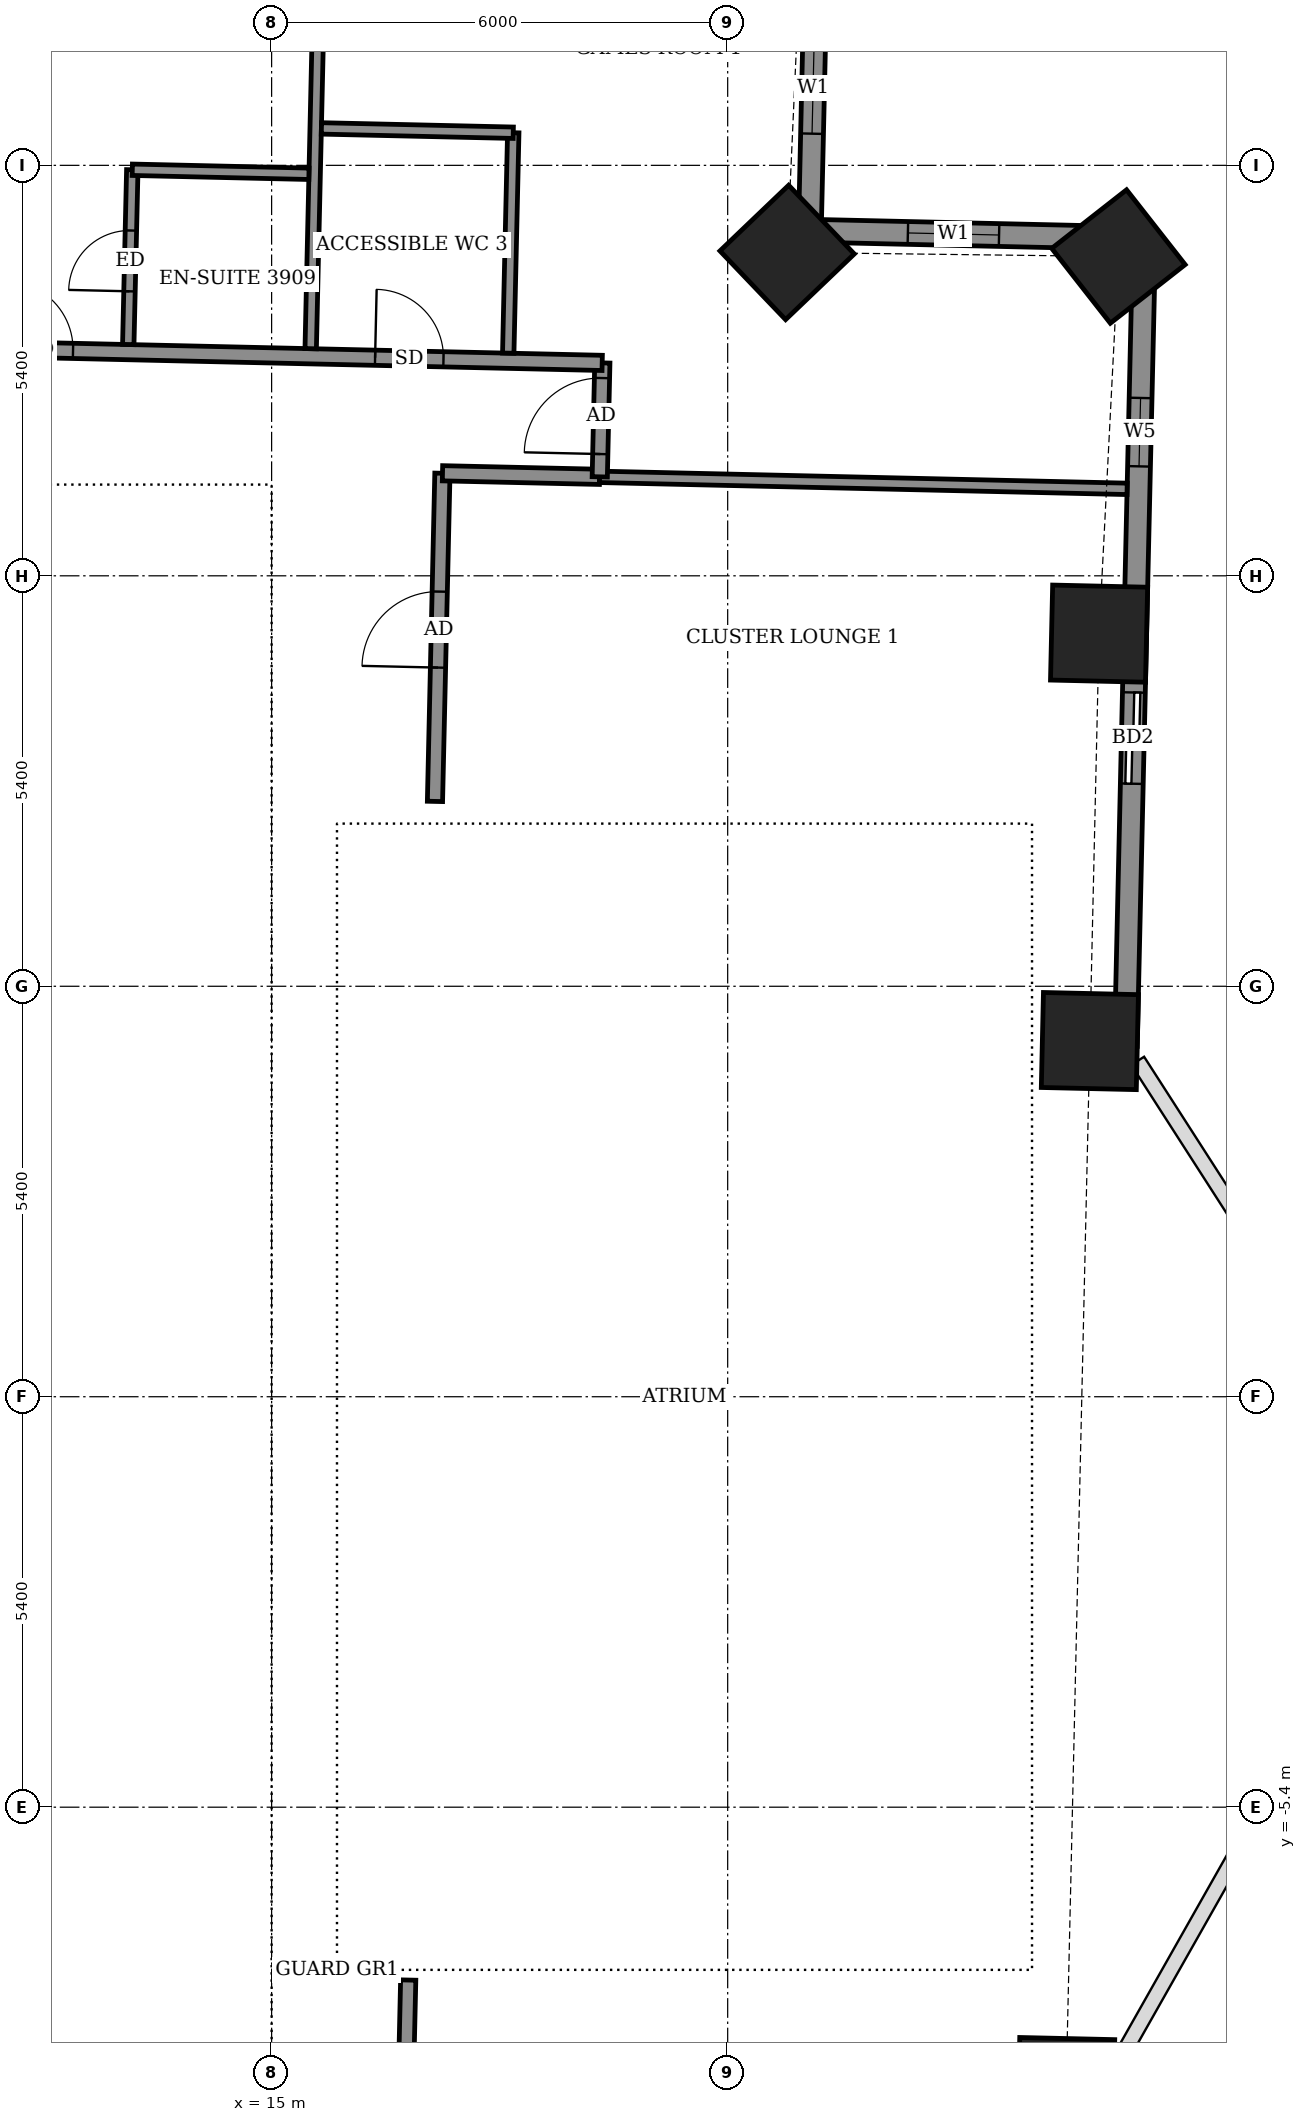
"""IFC4 building model, lengths in metres.
Left out: names, types, materials, properties, quantities, classifications, styles, units other than length and angle.
Written with IfcOpenShell. Run it as: python <this file> out.ifc"""

import sys

from ifc_helpers import new_model, si_unit, direction, frame, frame_2d, origin, origin_2d, place, context, subcontext, project, spatial, rectangle, extrude, element, fill, save


model = new_model("IFC4")
c1 = context("Model", 3, precision=1e-05, world=origin(), true_north=direction((0.0, 1.0)))
c2 = subcontext(c1, "Body", "Model", "MODEL_VIEW")
j1 = project(units=[si_unit("LENGTHUNIT", "METRE"), si_unit("PLANEANGLEUNIT", "RADIAN")], contexts=[c1])
p1 = place(None, origin())
s1 = spatial("IfcSite", under=j1, at=p1, CompositionType="ELEMENT")
p2 = place(p1, origin())
s2 = spatial("IfcBuilding", under=s1, at=p2, CompositionType="ELEMENT")
p3 = place(p2, frame((0.0, 0.0, 156.3)))
s3 = spatial("IfcBuildingStorey", under=s2, at=p3, CompositionType="ELEMENT", Elevation=156.3)
for number, where, z_axis, x_axis in (
    (1, (25.453, -9.069, -0.55), (0.0, 0.0, 1.0), (0.023, 1.0, 0.0)),
    (2, (25.765, 4.679, -0.55), (0.0, 0.0, 1.0), (0.023, 1.0, 0.0)),
    (3, (25.886, 10.039, -0.55), (0.0, 0.0, 1.0), (0.023, 1.0, 0.0)),
    (4, (26.141, 15.001, -0.55), (0.0, 0.0, 1.0), (-0.617, 0.787, 0.0)),
    (5, (21.782, 15.054, -0.55), (0.0, 0.0, 1.0), (-0.691, 0.723, 0.0)),
):
    element("IfcColumn", number, at=place(p3, frame(where, z_axis=z_axis, x_axis=x_axis)), inside=s3, PredefinedType="COLUMN", context=c2, shape_type="SweptSolid", body=[
        extrude(rectangle(XDim=1.25, YDim=1.25, at=origin_2d()), origin(), (0.0, 0.0, 1.0), 3.6),
    ])
p4 = place(p3, frame((26.238, 4.613, 0.0), z_axis=(0.0, 0.0, 1.0), x_axis=(0.022761056451, 0.999740933597, 0.0)))
e6 = element("IfcWall", 6, at=p4, inside=s3, PredefinedType="SOLIDWALL", context=c2, shape_type="SweptSolid", body=[
    extrude(rectangle(XDim=10.63, YDim=0.3, at=frame_2d((5.315, 0.0))), origin(), (0.0, 0.0, 1.0), 3.05),
])
p5 = place(p4, frame((3.453, 0.0, 0.0)))
e7 = element("IfcOpeningElement", 7, at=p5, cuts=e6, PredefinedType="OPENING", context=c2, shape_type="SweptSolid", body=[
    extrude(rectangle(XDim=1.2, YDim=2.4, at=frame_2d((0.6, 1.2))), frame((0.0, 0.16, 0.0), z_axis=(0.0, -1.0, 0.0), x_axis=(1.0, 0.0, 0.0)), (0.0, 0.0, 1.0), 0.32),
])
p6 = place(p4, frame((7.629, 0.0, 0.9)))
e8 = element("IfcOpeningElement", 8, at=p6, cuts=e6, PredefinedType="OPENING", context=c2, shape_type="SweptSolid", body=[
    extrude(rectangle(XDim=0.9, YDim=1.5, at=frame_2d((0.45, 0.75))), frame((0.0, 0.16, 0.0), z_axis=(0.0, -1.0, 0.0), x_axis=(1.0, 0.0, 0.0)), (0.0, 0.0, 1.0), 0.32),
])
p7 = place(p3, frame((26.48, 15.24, 0.0), z_axis=(0.0, 0.0, 1.0), x_axis=(-0.999741204967, 0.022749133868, 0.0)))
e9 = element("IfcWall", 9, at=p7, inside=s3, PredefinedType="SOLIDWALL", context=c2, shape_type="SweptSolid", body=[
    extrude(rectangle(XDim=4.4, YDim=0.3, at=frame_2d((2.2, 0.0))), origin(), (0.0, 0.0, 1.0), 2.55),
])
p8 = place(p7, frame((1.91, 0.0, 0.9)))
e10 = element("IfcOpeningElement", 10, at=p8, cuts=e9, PredefinedType="OPENING", context=c2, shape_type="SweptSolid", body=[
    extrude(rectangle(XDim=1.2, YDim=1.5, at=frame_2d((0.6, 0.75))), frame((0.0, 0.16, 0.0), z_axis=(0.0, -1.0, 0.0), x_axis=(1.0, 0.0, 0.0)), (0.0, 0.0, 1.0), 0.32),
])
p9 = place(p3, frame((22.081, 15.34, 0.0), z_axis=(0.0, 0.0, 1.0), x_axis=(0.022693676786, 0.999742465355, 0.0)))
e11 = element("IfcWall", 11, at=p9, inside=s3, PredefinedType="SOLIDWALL", context=c2, shape_type="SweptSolid", body=[
    extrude(rectangle(XDim=4.4, YDim=0.3, at=frame_2d((2.2, 0.0))), origin(), (0.0, 0.0, 1.0), 2.55),
])
p10 = place(p9, frame((1.277, 0.0, 0.9)))
e12 = element("IfcOpeningElement", 12, at=p10, cuts=e11, PredefinedType="OPENING", context=c2, shape_type="SweptSolid", body=[
    extrude(rectangle(XDim=1.2, YDim=1.5, at=frame_2d((0.6, 0.75))), frame((0.0, 0.16, 0.0), z_axis=(0.0, -1.0, 0.0), x_axis=(1.0, 0.0, 0.0)), (0.0, 0.0, 1.0), 0.32),
])
p11 = place(p3, frame((16.611, -15.868, 0.0), z_axis=(0.0, 0.0, 1.0), x_axis=(0.022698399288, 0.999742358145, 0.0)))
e13 = element("IfcWall", 13, at=p11, inside=s3, PredefinedType="PARTITIONING", context=c2, shape_type="SweptSolid", body=[
    extrude(rectangle(XDim=8.196, YDim=0.2, at=frame_2d((4.098, 0.0))), origin(), (0.0, 0.0, 1.0), 3.05),
])
p12 = place(p11, frame((3.025, 0.0, 0.0)))
e14 = element("IfcOpeningElement", 14, at=p12, cuts=e13, PredefinedType="OPENING", context=c2, shape_type="SweptSolid", body=[
    extrude(rectangle(XDim=0.9, YDim=2.1, at=frame_2d((0.45, 1.05))), frame((0.0, 0.11, 0.0), z_axis=(0.0, -1.0, 0.0), x_axis=(1.0, 0.0, 0.0)), (0.0, 0.0, 1.0), 0.22),
])
p13 = place(p11, frame((5.786, 0.0, 0.0)))
e15 = element("IfcOpeningElement", 15, at=p13, cuts=e13, PredefinedType="OPENING", context=c2, shape_type="SweptSolid", body=[
    extrude(rectangle(XDim=1.0, YDim=2.1, at=frame_2d((0.5, 1.05))), frame((0.0, 0.11, 0.0), z_axis=(0.0, -1.0, 0.0), x_axis=(1.0, 0.0, 0.0)), (0.0, 0.0, 1.0), 0.22),
])
p14 = place(p3, frame((17.149, 7.832, 0.0), z_axis=(0.0, 0.0, 1.0), x_axis=(0.022729111383, 0.999741660378, 0.0)))
e16 = element("IfcWall", 16, at=p14, inside=s3, PredefinedType="PARTITIONING", context=c2, shape_type="SweptSolid", body=[
    extrude(rectangle(XDim=4.318, YDim=0.2, at=frame_2d((2.159, 0.0))), origin(), (0.0, 0.0, 1.0), 3.05),
])
p15 = place(p14, frame((1.761, 0.0, 0.0)))
e17 = element("IfcOpeningElement", 17, at=p15, cuts=e16, PredefinedType="OPENING", context=c2, shape_type="SweptSolid", body=[
    extrude(rectangle(XDim=1.0, YDim=2.1, at=frame_2d((0.5, 1.05))), frame((0.0, 0.11, 0.0), z_axis=(0.0, -1.0, 0.0), x_axis=(1.0, 0.0, 0.0)), (0.0, 0.0, 1.0), 0.22),
])
p16 = place(p3, frame((17.248, 12.149, 0.0), z_axis=(0.0, 0.0, 1.0), x_axis=(0.999742931749, -0.02267312106, 0.0)))
e18 = element("IfcWall", 18, at=p16, inside=s3, PredefinedType="PARTITIONING", context=c2, shape_type="SweptSolid", body=[
    extrude(rectangle(XDim=2.067, YDim=0.2, at=frame_2d((1.034, 0.0))), origin(), (0.0, 0.0, 1.0), 3.05),
])
p17 = place(p3, frame((19.315, 12.102, 0.0), z_axis=(0.0, 0.0, 1.0), x_axis=(0.999741072391, -0.022754959327, 0.0)))
e19 = element("IfcWall", 19, at=p17, inside=s3, PredefinedType="PARTITIONING", context=c2, shape_type="SweptSolid", body=[
    extrude(rectangle(XDim=6.942, YDim=0.15, at=frame_2d((3.471, 0.0))), origin(), (0.0, 0.0, 1.0), 2.55),
])
p18 = place(p3, frame((19.317, 12.102, 0.0), z_axis=(0.0, 0.0, 1.0), x_axis=(0.02279537805, 0.999740151609, 0.0)))
e20 = element("IfcWall", 20, at=p18, inside=s3, PredefinedType="PARTITIONING", context=c2, shape_type="SweptSolid", body=[
    extrude(rectangle(XDim=1.5, YDim=0.2, at=frame_2d((0.75, 0.0))), origin(), (0.0, 0.0, 1.0), 3.05),
])
p19 = place(p18, frame((0.3, 0.0, 0.0)))
e21 = element("IfcOpeningElement", 21, at=p19, cuts=e20, PredefinedType="OPENING", context=c2, shape_type="SweptSolid", body=[
    extrude(rectangle(XDim=1.0, YDim=2.1, at=frame_2d((0.5, 1.05))), frame((0.0, 0.11, 0.0), z_axis=(0.0, -1.0, 0.0), x_axis=(1.0, 0.0, 0.0)), (0.0, 0.0, 1.0), 0.22),
])
p20 = place(p3, frame((-21.279, 14.523, 0.0), z_axis=(0.0, 0.0, 1.0), x_axis=(0.999742669174, -0.02268469602, 0.0)))
e22 = element("IfcWall", 22, at=p20, inside=s3, PredefinedType="PARTITIONING", context=c2, shape_type="SweptSolid", body=[
    extrude(rectangle(XDim=40.639, YDim=0.2, at=frame_2d((20.319, 0.0))), origin(), (0.0, 0.0, 1.0), 3.05),
])
p21 = place(p20, frame((37.65, 0.0, 0.0)))
e23 = element("IfcOpeningElement", 23, at=p21, cuts=e22, PredefinedType="OPENING", context=c2, shape_type="SweptSolid", body=[
    extrude(rectangle(XDim=0.9, YDim=2.1, at=frame_2d((0.45, 1.05))), frame((0.0, 0.11, 0.0), z_axis=(0.0, -1.0, 0.0), x_axis=(1.0, 0.0, 0.0)), (0.0, 0.0, 1.0), 0.22),
])
p22 = place(p20, frame((32.775, 0.0, 0.0)))
e24 = element("IfcOpeningElement", 24, at=p22, cuts=e22, PredefinedType="OPENING", context=c2, shape_type="SweptSolid", body=[
    extrude(rectangle(XDim=0.9, YDim=2.1, at=frame_2d((0.45, 1.05))), frame((0.0, 0.11, 0.0), z_axis=(0.0, -1.0, 0.0), x_axis=(1.0, 0.0, 0.0)), (0.0, 0.0, 1.0), 0.22),
])
p23 = place(p20, frame((30.4, 0.0, 0.0)))
e25 = element("IfcOpeningElement", 25, at=p23, cuts=e22, PredefinedType="OPENING", context=c2, shape_type="SweptSolid", body=[
    extrude(rectangle(XDim=0.9, YDim=2.1, at=frame_2d((0.45, 1.05))), frame((0.0, 0.11, 0.0), z_axis=(0.0, -1.0, 0.0), x_axis=(1.0, 0.0, 0.0)), (0.0, 0.0, 1.0), 0.22),
])
p24 = place(p20, frame((23.225, 0.0, 0.0)))
e26 = element("IfcOpeningElement", 26, at=p24, cuts=e22, PredefinedType="OPENING", context=c2, shape_type="SweptSolid", body=[
    extrude(rectangle(XDim=0.9, YDim=2.1, at=frame_2d((0.45, 1.05))), frame((0.0, 0.11, 0.0), z_axis=(0.0, -1.0, 0.0), x_axis=(1.0, 0.0, 0.0)), (0.0, 0.0, 1.0), 0.22),
])
p25 = place(p20, frame((20.85, 0.0, 0.0)))
e27 = element("IfcOpeningElement", 27, at=p25, cuts=e22, PredefinedType="OPENING", context=c2, shape_type="SweptSolid", body=[
    extrude(rectangle(XDim=0.9, YDim=2.1, at=frame_2d((0.45, 1.05))), frame((0.0, 0.11, 0.0), z_axis=(0.0, -1.0, 0.0), x_axis=(1.0, 0.0, 0.0)), (0.0, 0.0, 1.0), 0.22),
])
p26 = place(p20, frame((13.675, 0.0, 0.0)))
e28 = element("IfcOpeningElement", 28, at=p26, cuts=e22, PredefinedType="OPENING", context=c2, shape_type="SweptSolid", body=[
    extrude(rectangle(XDim=0.9, YDim=2.1, at=frame_2d((0.45, 1.05))), frame((0.0, 0.11, 0.0), z_axis=(0.0, -1.0, 0.0), x_axis=(1.0, 0.0, 0.0)), (0.0, 0.0, 1.0), 0.22),
])
p27 = place(p20, frame((11.325, 0.0, 0.0)))
e29 = element("IfcOpeningElement", 29, at=p27, cuts=e22, PredefinedType="OPENING", context=c2, shape_type="SweptSolid", body=[
    extrude(rectangle(XDim=0.9, YDim=2.1, at=frame_2d((0.45, 1.05))), frame((0.0, 0.11, 0.0), z_axis=(0.0, -1.0, 0.0), x_axis=(1.0, 0.0, 0.0)), (0.0, 0.0, 1.0), 0.22),
])
p28 = place(p20, frame((1.6, 0.0, 0.0)))
e30 = element("IfcOpeningElement", 30, at=p28, cuts=e22, PredefinedType="OPENING", context=c2, shape_type="SweptSolid", body=[
    extrude(rectangle(XDim=1.0, YDim=2.1, at=frame_2d((0.5, 1.05))), frame((0.0, 0.11, 0.0), z_axis=(0.0, -1.0, 0.0), x_axis=(1.0, 0.0, 0.0)), (0.0, 0.0, 1.0), 0.22),
])
p29 = place(p20, frame((6.55, 0.0, 0.0)))
e31 = element("IfcOpeningElement", 31, at=p29, cuts=e22, PredefinedType="OPENING", context=c2, shape_type="SweptSolid", body=[
    extrude(rectangle(XDim=0.9, YDim=2.1, at=frame_2d((0.45, 1.05))), frame((0.0, 0.11, 0.0), z_axis=(0.0, -1.0, 0.0), x_axis=(1.0, 0.0, 0.0)), (0.0, 0.0, 1.0), 0.22),
])
p30 = place(p3, frame((13.114, 13.843, 0.0), z_axis=(0.0, 0.0, 1.0), x_axis=(0.023037316498, 0.999734605807, 0.0)))
e32 = element("IfcWall", 32, at=p30, inside=s3, PredefinedType="PARTITIONING", context=c2, shape_type="SweptSolid", body=[
    extrude(rectangle(XDim=2.3, YDim=0.15, at=frame_2d((1.15, 0.0))), origin(), (0.0, 0.0, 1.0), 3.05),
])
p31 = place(p30, frame((0.7, 0.0, 0.0)))
e33 = element("IfcOpeningElement", 33, at=p31, cuts=e32, PredefinedType="OPENING", context=c2, shape_type="SweptSolid", body=[
    extrude(rectangle(XDim=0.8, YDim=2.1, at=frame_2d((0.4, 1.05))), frame((0.0, 0.085, 0.0), z_axis=(0.0, -1.0, 0.0), x_axis=(1.0, 0.0, 0.0)), (0.0, 0.0, 1.0), 0.17),
])
p32 = place(p3, frame((15.514, 13.788, 0.0), z_axis=(0.0, 0.0, 1.0), x_axis=(0.022688785847, 0.999742576365, 0.0)))
e34 = element("IfcWall", 34, at=p32, inside=s3, PredefinedType="PARTITIONING", context=c2, shape_type="SweptSolid", body=[
    extrude(rectangle(XDim=5.95, YDim=0.15, at=frame_2d((2.975, 0.0))), origin(), (0.0, 0.0, 1.0), 3.05),
])
p33 = place(p3, frame((18.113, 13.729, 0.0), z_axis=(0.0, 0.0, 1.0), x_axis=(0.022725229174, 0.999741748633, 0.0)))
e35 = element("IfcWall", 35, at=p33, inside=s3, PredefinedType="PARTITIONING", context=c2, shape_type="SweptSolid", body=[
    extrude(rectangle(XDim=2.901, YDim=0.15, at=frame_2d((1.45, 0.0))), origin(), (0.0, 0.0, 1.0), 3.05),
])
p34 = place(p3, frame((13.167, 16.142, 0.0), z_axis=(0.0, 0.0, 1.0), x_axis=(0.999740260747, -0.02279059109, 0.0)))
e36 = element("IfcWall", 36, at=p34, inside=s3, PredefinedType="PARTITIONING", context=c2, shape_type="SweptSolid", body=[
    extrude(rectangle(XDim=2.324, YDim=0.15, at=frame_2d((1.162, 0.0))), origin(), (0.0, 0.0, 1.0), 3.05),
])
p35 = place(p3, frame((15.655, 16.686, 0.0), z_axis=(0.0, 0.0, 1.0), x_axis=(0.99974392816, -0.022629142889, 0.0)))
e37 = element("IfcWall", 37, at=p35, inside=s3, PredefinedType="PARTITIONING", context=c2, shape_type="SweptSolid", body=[
    extrude(rectangle(XDim=2.525, YDim=0.15, at=frame_2d((1.262, 0.0))), origin(), (0.0, 0.0, 1.0), 3.05),
])
p36 = place(p3, frame((-14.7, 11.25, 0.0), z_axis=(0.0, 0.0, 1.0), x_axis=(1.0, 0.0, 0.0)))
e38 = element("IfcWall", 38, at=p36, inside=s3, PredefinedType="SHEAR", context=c2, shape_type="SweptSolid", body=[
    extrude(rectangle(XDim=29.4, YDim=0.9, at=frame_2d((14.7, 0.0))), origin(), (0.0, 0.0, 1.0), 3.6),
])
p37 = place(p3, frame((14.25, -10.8, 0.0), z_axis=(0.0, 0.0, 1.0), x_axis=(0.0, 1.0, 0.0)))
e39 = element("IfcWall", 39, at=p37, inside=s3, PredefinedType="SHEAR", context=c2, shape_type="SweptSolid", body=[
    extrude(rectangle(XDim=21.6, YDim=0.9, at=frame_2d((10.8, 0.0))), origin(), (0.0, 0.0, 1.0), 3.6),
])
p38 = place(p37, frame((1.2, 0.0, 0.0)))
e40 = element("IfcOpeningElement", 40, at=p38, cuts=e39, PredefinedType="OPENING", context=c2, shape_type="SweptSolid", body=[
    extrude(rectangle(XDim=1.2, YDim=2.1, at=frame_2d((0.6, 1.05))), frame((0.0, 0.46, 0.0), z_axis=(0.0, -1.0, 0.0), x_axis=(1.0, 0.0, 0.0)), (0.0, 0.0, 1.0), 0.92),
])
p39 = place(p3, frame((10.9, -0.7, 0.0), z_axis=(0.0, 0.0, 1.0), x_axis=(1.0, 0.0, 0.0)))
e41 = element("IfcWall", 41, at=p39, inside=s3, PredefinedType="STANDARD", context=c2, shape_type="SweptSolid", body=[
    extrude(rectangle(XDim=2.9, YDim=0.2, at=frame_2d((1.45, 0.0))), origin(), (0.0, 0.0, 1.0), 3.05),
])
p40 = place(p39, frame((0.85, 0.0, 0.0)))
e42 = element("IfcOpeningElement", 42, at=p40, cuts=e41, PredefinedType="OPENING", context=c2, shape_type="SweptSolid", body=[
    extrude(rectangle(XDim=1.2, YDim=2.1, at=frame_2d((0.6, 1.05))), frame((0.0, 0.11, 0.0), z_axis=(0.0, -1.0, 0.0), x_axis=(1.0, 0.0, 0.0)), (0.0, 0.0, 1.0), 0.22),
])
p41 = place(p5, origin())
e43 = element("IfcDoor", 43, at=p41, inside=s3, OperationType="SLIDING_TO_LEFT", PredefinedType="DOOR", context=c2, shape_type="SweptSolid", body=[
    extrude(rectangle(XDim=1.2, YDim=2.4, at=frame_2d((0.6, 1.2))), frame((0.0, 0.025, 0.0), z_axis=(0.0, -1.0, 0.0), x_axis=(1.0, 0.0, 0.0)), (0.0, 0.0, 1.0), 0.05),
])
fill(e7, e43)
p42 = place(p6, origin())
e44 = element("IfcWindow", 44, at=p42, inside=s3, PartitioningType="SINGLE_PANEL", PredefinedType="WINDOW", context=c2, shape_type="SweptSolid", body=[
    extrude(rectangle(XDim=0.9, YDim=1.5, at=frame_2d((0.45, 0.75))), frame((0.0, 0.03, 0.0), z_axis=(0.0, -1.0, 0.0), x_axis=(1.0, 0.0, 0.0)), (0.0, 0.0, 1.0), 0.06),
])
fill(e8, e44)
p43 = place(p8, origin())
e45 = element("IfcWindow", 45, at=p43, inside=s3, PartitioningType="SINGLE_PANEL", PredefinedType="WINDOW", context=c2, shape_type="SweptSolid", body=[
    extrude(rectangle(XDim=1.2, YDim=1.5, at=frame_2d((0.6, 0.75))), frame((0.0, 0.03, 0.0), z_axis=(0.0, -1.0, 0.0), x_axis=(1.0, 0.0, 0.0)), (0.0, 0.0, 1.0), 0.06),
])
fill(e10, e45)
p44 = place(p10, origin())
e46 = element("IfcWindow", 46, at=p44, inside=s3, PartitioningType="SINGLE_PANEL", PredefinedType="WINDOW", context=c2, shape_type="SweptSolid", body=[
    extrude(rectangle(XDim=1.2, YDim=1.5, at=frame_2d((0.6, 0.75))), frame((0.0, 0.03, 0.0), z_axis=(0.0, -1.0, 0.0), x_axis=(1.0, 0.0, 0.0)), (0.0, 0.0, 1.0), 0.06),
])
fill(e12, e46)
p45 = place(p15, origin())
e47 = element("IfcDoor", 47, at=p45, inside=s3, OperationType="SINGLE_SWING_RIGHT", PredefinedType="DOOR", context=c2, shape_type="SweptSolid", body=[
    extrude(rectangle(XDim=1.0, YDim=2.1, at=frame_2d((0.5, 1.05))), frame((0.0, 0.025, 0.0), z_axis=(0.0, -1.0, 0.0), x_axis=(1.0, 0.0, 0.0)), (0.0, 0.0, 1.0), 0.05),
])
fill(e17, e47)
p46 = place(p19, origin())
e48 = element("IfcDoor", 48, at=p46, inside=s3, OperationType="SINGLE_SWING_LEFT", PredefinedType="DOOR", context=c2, shape_type="SweptSolid", body=[
    extrude(rectangle(XDim=1.0, YDim=2.1, at=frame_2d((0.5, 1.05))), frame((0.0, 0.025, 0.0), z_axis=(0.0, -1.0, 0.0), x_axis=(1.0, 0.0, 0.0)), (0.0, 0.0, 1.0), 0.05),
])
fill(e21, e48)
p47 = place(p21, origin())
e49 = element("IfcDoor", 49, at=p47, inside=s3, OperationType="SINGLE_SWING_LEFT", PredefinedType="DOOR", context=c2, shape_type="SweptSolid", body=[
    extrude(rectangle(XDim=0.9, YDim=2.1, at=frame_2d((0.45, 1.05))), frame((0.0, 0.025, 0.0), z_axis=(0.0, -1.0, 0.0), x_axis=(1.0, 0.0, 0.0)), (0.0, 0.0, 1.0), 0.05),
])
fill(e23, e49)
p48 = place(p22, origin())
e50 = element("IfcDoor", 50, at=p48, inside=s3, OperationType="SINGLE_SWING_LEFT", PredefinedType="DOOR", context=c2, shape_type="SweptSolid", body=[
    extrude(rectangle(XDim=0.9, YDim=2.1, at=frame_2d((0.45, 1.05))), frame((0.0, 0.025, 0.0), z_axis=(0.0, -1.0, 0.0), x_axis=(1.0, 0.0, 0.0)), (0.0, 0.0, 1.0), 0.05),
])
fill(e24, e50)
p49 = place(p31, origin())
e51 = element("IfcDoor", 51, at=p49, inside=s3, OperationType="SINGLE_SWING_LEFT", PredefinedType="DOOR", context=c2, shape_type="SweptSolid", body=[
    extrude(rectangle(XDim=0.8, YDim=2.1, at=frame_2d((0.4, 1.05))), frame((0.0, 0.025, 0.0), z_axis=(0.0, -1.0, 0.0), x_axis=(1.0, 0.0, 0.0)), (0.0, 0.0, 1.0), 0.05),
])
fill(e33, e51)
p50 = place(p38, origin())
e52 = element("IfcDoor", 52, at=p50, inside=s3, OperationType="DOUBLE_DOOR_SINGLE_SWING", PredefinedType="DOOR", context=c2, shape_type="SweptSolid", body=[
    extrude(rectangle(XDim=1.2, YDim=2.1, at=frame_2d((0.6, 1.05))), frame((0.0, 0.025, 0.0), z_axis=(0.0, -1.0, 0.0), x_axis=(1.0, 0.0, 0.0)), (0.0, 0.0, 1.0), 0.05),
])
fill(e40, e52)
p51 = place(p40, origin())
e53 = element("IfcDoor", 53, at=p51, inside=s3, OperationType="SINGLE_SWING_LEFT", PredefinedType="DOOR", context=c2, shape_type="SweptSolid", body=[
    extrude(rectangle(XDim=1.2, YDim=2.1, at=frame_2d((0.6, 1.05))), frame((0.0, 0.025, 0.0), z_axis=(0.0, -1.0, 0.0), x_axis=(1.0, 0.0, 0.0)), (0.0, 0.0, 1.0), 0.05),
])
fill(e42, e53)
save(model, sys.argv[1])
